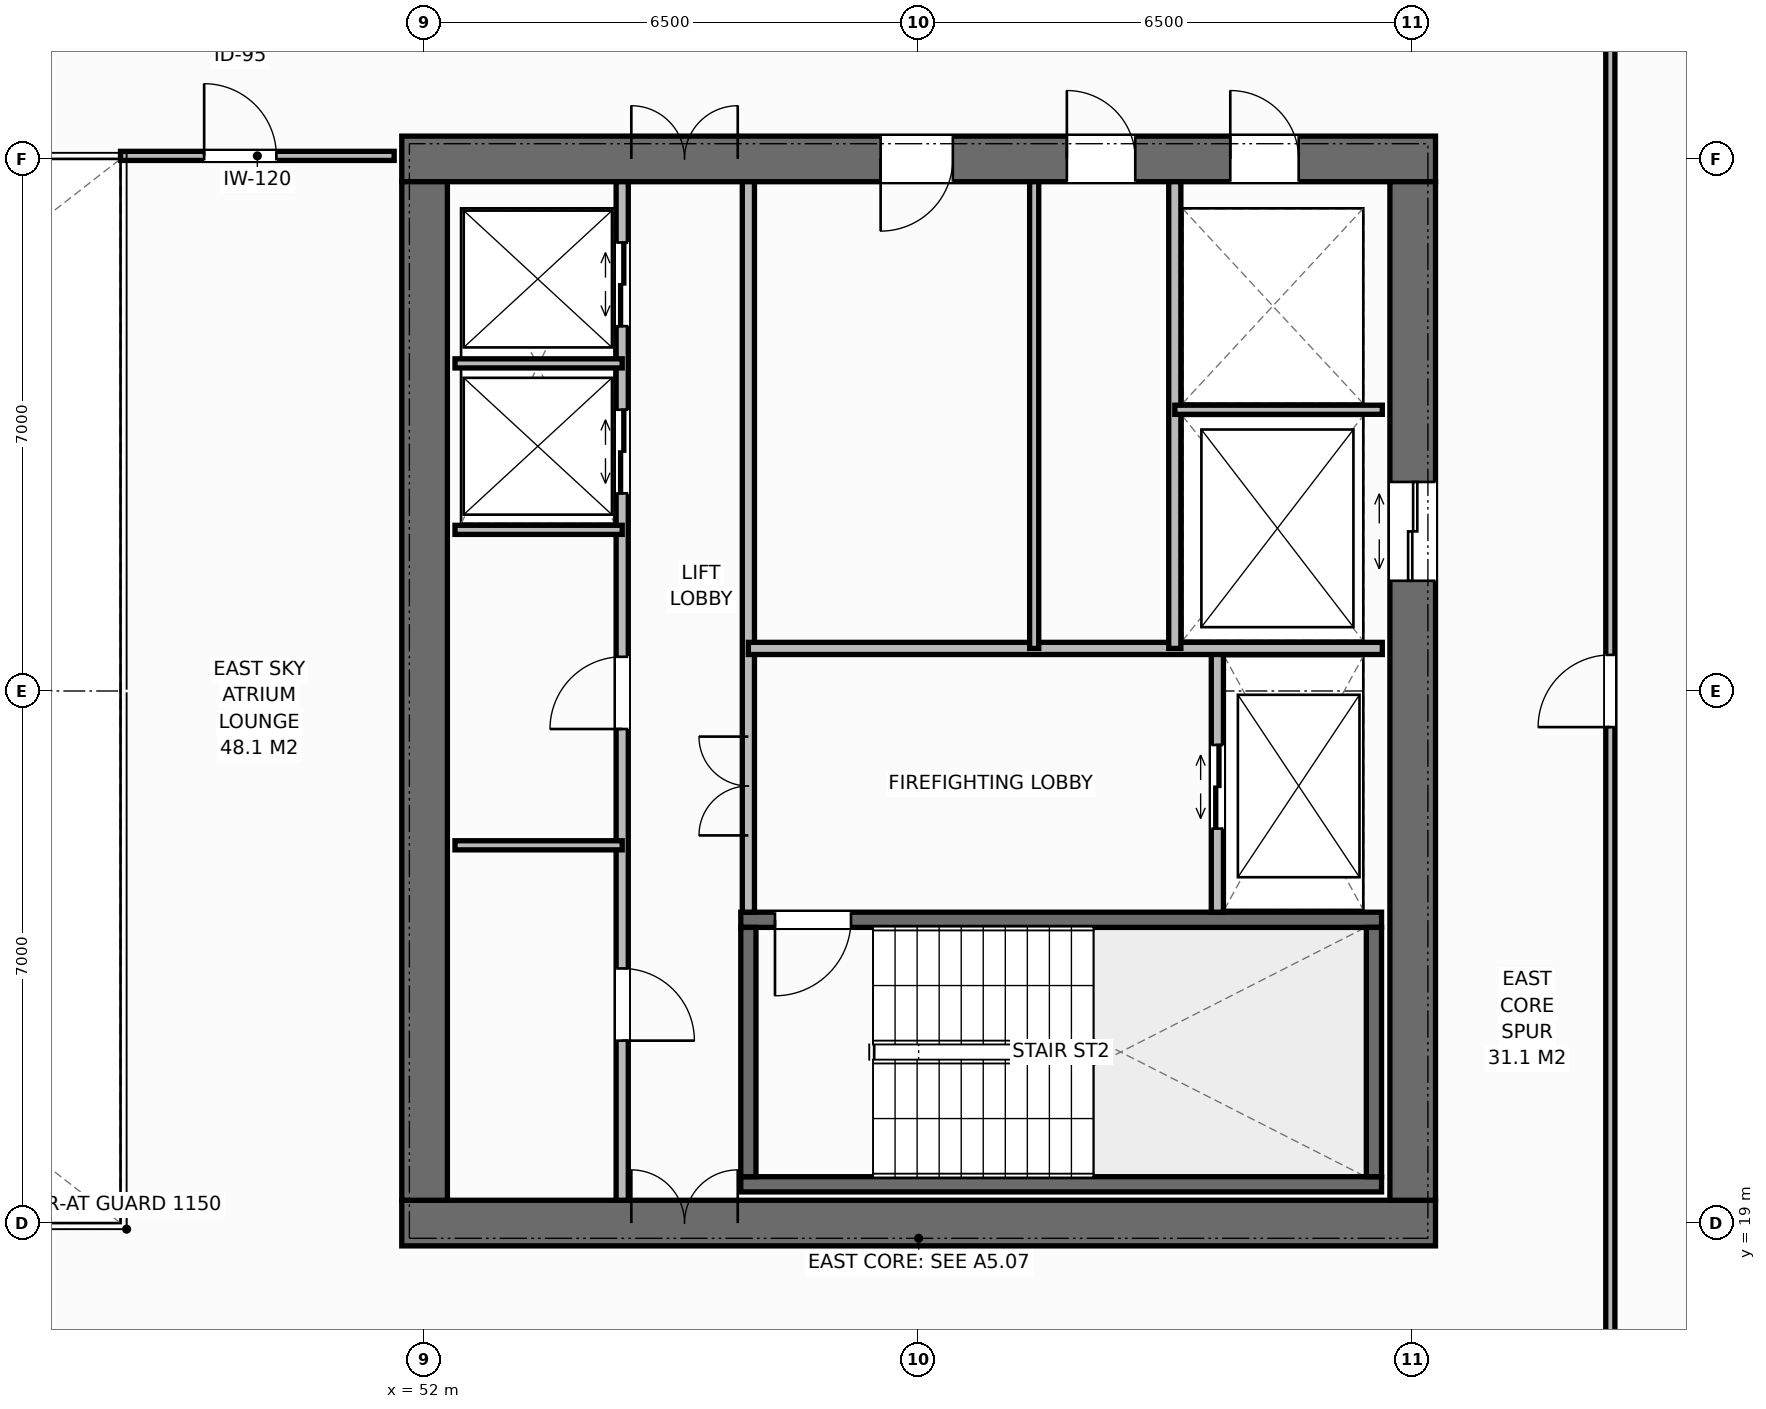
"""IFC4 building model, lengths in metres.
Left out: names, types, materials, properties, quantities, classifications, styles, units other than length and angle.
Written with IfcOpenShell. Run it as: python <this file> out.ifc"""

import sys

from ifc_helpers import new_model, si_unit, direction, frame, frame_2d, origin, place, context, subcontext, project, spatial, rectangle, extrude, element, fill, save


model = new_model("IFC4")
c1 = context("Model", 3, precision=1e-05, world=origin(), true_north=direction((0.0, 1.0)))
c2 = subcontext(c1, "Body", "Model", "MODEL_VIEW")
j1 = project(units=[si_unit("LENGTHUNIT", "METRE"), si_unit("PLANEANGLEUNIT", "RADIAN")], contexts=[c1])
p1 = place(None, origin())
s1 = spatial("IfcSite", under=j1, at=p1, CompositionType="ELEMENT")
p2 = place(p1, origin())
s2 = spatial("IfcBuilding", under=s1, at=p2, CompositionType="ELEMENT")
p3 = place(p2, frame((0.0, 0.0, 155.6)))
s3 = spatial("IfcBuildingStorey", under=s2, at=p3, CompositionType="ELEMENT", Elevation=155.6)
p4 = place(p3, frame((51.7, 19.0, 0.0), z_axis=(0.0, 0.0, 1.0), x_axis=(1.0, 0.0, 0.0)))
e1 = element("IfcWall", 1, at=p4, inside=s3, PredefinedType="SHEAR", context=c2, shape_type="SweptSolid", body=[
    extrude(rectangle(XDim=13.6, YDim=0.6, at=frame_2d((6.8, 0.0))), origin(), (0.0, 0.0, 1.0), 3.8),
])
p5 = place(p4, frame((3.02, 0.0, 0.0)))
e2 = element("IfcOpeningElement", 2, at=p5, cuts=e1, PredefinedType="OPENING", context=c2, shape_type="SweptSolid", body=[
    extrude(rectangle(XDim=1.4, YDim=2.2, at=frame_2d((0.7, 1.1))), frame((0.0, 0.31, 0.0), z_axis=(0.0, -1.0, 0.0), x_axis=(1.0, 0.0, 0.0)), (0.0, 0.0, 1.0), 0.62),
])
p6 = place(p3, frame((51.7, 33.0, 0.0), z_axis=(0.0, 0.0, 1.0), x_axis=(1.0, 0.0, 0.0)))
e3 = element("IfcWall", 3, at=p6, inside=s3, PredefinedType="SHEAR", context=c2, shape_type="SweptSolid", body=[
    extrude(rectangle(XDim=13.6, YDim=0.6, at=frame_2d((6.8, 0.0))), origin(), (0.0, 0.0, 1.0), 3.8),
])
p7 = place(p6, frame((3.02, 0.0, 0.0)))
e4 = element("IfcOpeningElement", 4, at=p7, cuts=e3, PredefinedType="OPENING", context=c2, shape_type="SweptSolid", body=[
    extrude(rectangle(XDim=1.4, YDim=2.2, at=frame_2d((0.7, 1.1))), frame((0.0, 0.31, 0.0), z_axis=(0.0, -1.0, 0.0), x_axis=(1.0, 0.0, 0.0)), (0.0, 0.0, 1.0), 0.62),
])
p8 = place(p6, frame((10.9, 0.0, 0.0)))
e5 = element("IfcOpeningElement", 5, at=p8, cuts=e3, PredefinedType="OPENING", context=c2, shape_type="SweptSolid", body=[
    extrude(rectangle(XDim=0.9, YDim=2.15, at=frame_2d((0.45, 1.075))), frame((0.0, 0.31, 0.0), z_axis=(0.0, -1.0, 0.0), x_axis=(1.0, 0.0, 0.0)), (0.0, 0.0, 1.0), 0.62),
])
p9 = place(p6, frame((6.3, 0.0, 0.0)))
e6 = element("IfcOpeningElement", 6, at=p9, cuts=e3, PredefinedType="OPENING", context=c2, shape_type="SweptSolid", body=[
    extrude(rectangle(XDim=0.95, YDim=2.15, at=frame_2d((0.475, 1.075))), frame((0.0, 0.31, 0.0), z_axis=(0.0, -1.0, 0.0), x_axis=(1.0, 0.0, 0.0)), (0.0, 0.0, 1.0), 0.62),
])
p10 = place(p6, frame((8.75, 0.0, 0.0)))
e7 = element("IfcOpeningElement", 7, at=p10, cuts=e3, PredefinedType="OPENING", context=c2, shape_type="SweptSolid", body=[
    extrude(rectangle(XDim=0.9, YDim=2.15, at=frame_2d((0.45, 1.075))), frame((0.0, 0.31, 0.0), z_axis=(0.0, -1.0, 0.0), x_axis=(1.0, 0.0, 0.0)), (0.0, 0.0, 1.0), 0.62),
])
p11 = place(p3, frame((52.0, 19.3, 0.0), z_axis=(0.0, 0.0, 1.0), x_axis=(0.0, 1.0, 0.0)))
e8 = element("IfcWall", 8, at=p11, inside=s3, PredefinedType="SHEAR", context=c2, shape_type="SweptSolid", body=[
    extrude(rectangle(XDim=13.4, YDim=0.6, at=frame_2d((6.7, 0.0))), origin(), (0.0, 0.0, 1.0), 3.8),
])
p12 = place(p3, frame((65.0, 19.3, 0.0), z_axis=(0.0, 0.0, 1.0), x_axis=(0.0, 1.0, 0.0)))
e9 = element("IfcWall", 9, at=p12, inside=s3, PredefinedType="SHEAR", context=c2, shape_type="SweptSolid", body=[
    extrude(rectangle(XDim=13.4, YDim=0.6, at=frame_2d((6.7, 0.0))), origin(), (0.0, 0.0, 1.0), 3.8),
])
p13 = place(p12, frame((8.15, 0.0, 0.0)))
e10 = element("IfcOpeningElement", 10, at=p13, cuts=e9, PredefinedType="OPENING", context=c2, shape_type="SweptSolid", body=[
    extrude(rectangle(XDim=1.3, YDim=2.2, at=frame_2d((0.65, 1.1))), frame((0.0, 0.31, 0.0), z_axis=(0.0, -1.0, 0.0), x_axis=(1.0, 0.0, 0.0)), (0.0, 0.0, 1.0), 0.62),
])
p14 = place(p3, frame((56.16, 19.51, 0.0), z_axis=(0.0, 0.0, 1.0), x_axis=(1.0, 0.0, 0.0)))
e11 = element("IfcWall", 11, at=p14, inside=s3, PredefinedType="SHEAR", context=c2, shape_type="SweptSolid", body=[
    extrude(rectangle(XDim=8.43, YDim=0.2, at=frame_2d((4.215, 0.0))), origin(), (0.0, 0.0, 1.0), 3.8),
])
p15 = place(p3, frame((56.16, 22.99, 0.0), z_axis=(0.0, 0.0, 1.0), x_axis=(1.0, 0.0, 0.0)))
e12 = element("IfcWall", 12, at=p15, inside=s3, PredefinedType="SHEAR", context=c2, shape_type="SweptSolid", body=[
    extrude(rectangle(XDim=8.43, YDim=0.2, at=frame_2d((4.215, 0.0))), origin(), (0.0, 0.0, 1.0), 3.8),
])
p16 = place(p15, frame((0.45, 0.0, 0.0)))
e13 = element("IfcOpeningElement", 13, at=p16, cuts=e12, PredefinedType="OPENING", context=c2, shape_type="SweptSolid", body=[
    extrude(rectangle(XDim=1.0, YDim=2.15, at=frame_2d((0.5, 1.075))), frame((0.0, 0.11, 0.0), z_axis=(0.0, -1.0, 0.0), x_axis=(1.0, 0.0, 0.0)), (0.0, 0.0, 1.0), 0.22),
])
for number, where, z_axis, x_axis in (
    (14, (56.26, 19.61, 0.0), (0.0, 0.0, 1.0), (0.0, 1.0, 0.0)),
    (15, (64.49, 19.61, 0.0), (0.0, 0.0, 1.0), (0.0, 1.0, 0.0)),
):
    element("IfcWall", number, at=place(p3, frame(where, z_axis=z_axis, x_axis=x_axis)), inside=s3, PredefinedType="SHEAR", context=c2, shape_type="SweptSolid", body=[
        extrude(rectangle(XDim=3.28, YDim=0.2, at=frame_2d((1.64, 0.0))), origin(), (0.0, 0.0, 1.0), 3.8),
    ])
p17 = place(p3, frame((54.6, 19.3, 0.0), z_axis=(0.0, 0.0, 1.0), x_axis=(0.0, 1.0, 0.0)))
e16 = element("IfcWall", 16, at=p17, inside=s3, PredefinedType="STANDARD", context=c2, shape_type="SweptSolid", body=[
    extrude(rectangle(XDim=13.4, YDim=0.16, at=frame_2d((6.7, 0.0))), origin(), (0.0, 0.0, 1.0), 3.572),
])
p18 = place(p17, frame((2.1, 0.0, 0.0)))
e17 = element("IfcOpeningElement", 17, at=p18, cuts=e16, PredefinedType="OPENING", context=c2, shape_type="SweptSolid", body=[
    extrude(rectangle(XDim=0.95, YDim=2.15, at=frame_2d((0.475, 1.075))), frame((0.0, 0.09, 0.0), z_axis=(0.0, -1.0, 0.0), x_axis=(1.0, 0.0, 0.0)), (0.0, 0.0, 1.0), 0.18),
])
p19 = place(p17, frame((6.2, 0.0, 0.0)))
e18 = element("IfcOpeningElement", 18, at=p19, cuts=e16, PredefinedType="OPENING", context=c2, shape_type="SweptSolid", body=[
    extrude(rectangle(XDim=0.95, YDim=2.15, at=frame_2d((0.475, 1.075))), frame((0.0, 0.09, 0.0), z_axis=(0.0, -1.0, 0.0), x_axis=(1.0, 0.0, 0.0)), (0.0, 0.0, 1.0), 0.18),
])
p20 = place(p17, frame((9.3, 0.0, 0.0)))
e19 = element("IfcOpeningElement", 19, at=p20, cuts=e16, PredefinedType="OPENING", context=c2, shape_type="SweptSolid", body=[
    extrude(rectangle(XDim=1.1, YDim=2.2, at=frame_2d((0.55, 1.1))), frame((0.0, 0.09, 0.0), z_axis=(0.0, -1.0, 0.0), x_axis=(1.0, 0.0, 0.0)), (0.0, 0.0, 1.0), 0.18),
])
p21 = place(p17, frame((11.5, 0.0, 0.0)))
e20 = element("IfcOpeningElement", 20, at=p21, cuts=e16, PredefinedType="OPENING", context=c2, shape_type="SweptSolid", body=[
    extrude(rectangle(XDim=1.1, YDim=2.2, at=frame_2d((0.55, 1.1))), frame((0.0, 0.09, 0.0), z_axis=(0.0, -1.0, 0.0), x_axis=(1.0, 0.0, 0.0)), (0.0, 0.0, 1.0), 0.18),
])
p22 = place(p3, frame((56.26, 23.09, 0.0), z_axis=(0.0, 0.0, 1.0), x_axis=(0.0, 1.0, 0.0)))
e21 = element("IfcWall", 21, at=p22, inside=s3, PredefinedType="STANDARD", context=c2, shape_type="SweptSolid", body=[
    extrude(rectangle(XDim=9.61, YDim=0.16, at=frame_2d((4.805, 0.0))), origin(), (0.0, 0.0, 1.0), 3.572),
])
p23 = place(p22, frame((1.01, 0.0, 0.0)))
e22 = element("IfcOpeningElement", 22, at=p23, cuts=e21, PredefinedType="OPENING", context=c2, shape_type="SweptSolid", body=[
    extrude(rectangle(XDim=1.3, YDim=2.2, at=frame_2d((0.65, 1.1))), frame((0.0, 0.09, 0.0), z_axis=(0.0, -1.0, 0.0), x_axis=(1.0, 0.0, 0.0)), (0.0, 0.0, 1.0), 0.18),
])
for number, where, z_axis, x_axis in (
    (23, (52.4, 23.97, 0.0), (0.0, 0.0, 1.0), (1.0, 0.0, 0.0)),
    (24, (52.4, 28.12, 0.0), (0.0, 0.0, 1.0), (1.0, 0.0, 0.0)),
    (25, (52.4, 30.31, 0.0), (0.0, 0.0, 1.0), (1.0, 0.0, 0.0)),
):
    element("IfcWall", number, at=place(p3, frame(where, z_axis=z_axis, x_axis=x_axis)), inside=s3, PredefinedType="PARTITIONING", context=c2, shape_type="SweptSolid", body=[
        extrude(rectangle(XDim=2.2, YDim=0.12, at=frame_2d((1.1, 0.0))), origin(), (0.0, 0.0, 1.0), 3.572),
    ])
p24 = place(p3, frame((62.43, 23.09, 0.0), z_axis=(0.0, 0.0, 1.0), x_axis=(0.0, 1.0, 0.0)))
e26 = element("IfcWall", 26, at=p24, inside=s3, PredefinedType="STANDARD", context=c2, shape_type="SweptSolid", body=[
    extrude(rectangle(XDim=3.47, YDim=0.16, at=frame_2d((1.735, 0.0))), origin(), (0.0, 0.0, 1.0), 3.572),
])
p25 = place(p24, frame((1.1, 0.0, 0.0)))
e27 = element("IfcOpeningElement", 27, at=p25, cuts=e26, PredefinedType="OPENING", context=c2, shape_type="SweptSolid", body=[
    extrude(rectangle(XDim=1.1, YDim=2.2, at=frame_2d((0.55, 1.1))), frame((0.0, 0.09, 0.0), z_axis=(0.0, -1.0, 0.0), x_axis=(1.0, 0.0, 0.0)), (0.0, 0.0, 1.0), 0.18),
])
p26 = place(p3, frame((56.26, 26.56, 0.0), z_axis=(0.0, 0.0, 1.0), x_axis=(1.0, 0.0, 0.0)))
e28 = element("IfcWall", 28, at=p26, inside=s3, PredefinedType="STANDARD", context=c2, shape_type="SweptSolid", body=[
    extrude(rectangle(XDim=8.34, YDim=0.16, at=frame_2d((4.17, 0.0))), origin(), (0.0, 0.0, 1.0), 3.572),
])
p27 = place(p3, frame((61.87, 26.56, 0.0), z_axis=(0.0, 0.0, 1.0), x_axis=(0.0, 1.0, 0.0)))
e29 = element("IfcWall", 29, at=p27, inside=s3, PredefinedType="STANDARD", context=c2, shape_type="SweptSolid", body=[
    extrude(rectangle(XDim=6.14, YDim=0.16, at=frame_2d((3.07, 0.0))), origin(), (0.0, 0.0, 1.0), 3.572),
])
p28 = place(p3, frame((61.87, 29.7, 0.0), z_axis=(0.0, 0.0, 1.0), x_axis=(1.0, 0.0, 0.0)))
e30 = element("IfcWall", 30, at=p28, inside=s3, PredefinedType="PARTITIONING", context=c2, shape_type="SweptSolid", body=[
    extrude(rectangle(XDim=2.73, YDim=0.12, at=frame_2d((1.365, 0.0))), origin(), (0.0, 0.0, 1.0), 3.572),
])
p29 = place(p3, frame((60.02, 26.56, 0.0), z_axis=(0.0, 0.0, 1.0), x_axis=(0.0, 1.0, 0.0)))
e31 = element("IfcWall", 31, at=p29, inside=s3, PredefinedType="PARTITIONING", context=c2, shape_type="SweptSolid", body=[
    extrude(rectangle(XDim=6.14, YDim=0.12, at=frame_2d((3.07, 0.0))), origin(), (0.0, 0.0, 1.0), 3.572),
])
p30 = place(p3, frame((48.0, 33.04, 0.0), z_axis=(0.0, 0.0, 1.0), x_axis=(1.0, 0.0, 0.0)))
e32 = element("IfcWall", 32, at=p30, inside=s3, PredefinedType="PARTITIONING", context=c2, shape_type="SweptSolid", body=[
    extrude(rectangle(XDim=3.6, YDim=0.12, at=frame_2d((1.8, 0.0))), origin(), (0.0, 0.0, 1.0), 3.312),
])
p31 = place(p30, frame((1.1, 0.0, 0.0)))
e33 = element("IfcOpeningElement", 33, at=p31, cuts=e32, PredefinedType="OPENING", context=c2, shape_type="SweptSolid", body=[
    extrude(rectangle(XDim=0.95, YDim=2.15, at=frame_2d((0.475, 1.075))), frame((0.0, 0.07, 0.0), z_axis=(0.0, -1.0, 0.0), x_axis=(1.0, 0.0, 0.0)), (0.0, 0.0, 1.0), 0.14),
])
p32 = place(p3, frame((67.6, 16.5, 0.0), z_axis=(0.0, 0.0, 1.0), x_axis=(0.0, 1.0, 0.0)))
e34 = element("IfcWall", 34, at=p32, inside=s3, PredefinedType="PARTITIONING", context=c2, shape_type="SweptSolid", body=[
    extrude(rectangle(XDim=19.0, YDim=0.12, at=frame_2d((9.5, 0.0))), origin(), (0.0, 0.0, 1.0), 3.572),
])
p33 = place(p32, frame((9.025, 0.0, 0.0)))
e35 = element("IfcOpeningElement", 35, at=p33, cuts=e34, PredefinedType="OPENING", context=c2, shape_type="SweptSolid", body=[
    extrude(rectangle(XDim=0.95, YDim=2.15, at=frame_2d((0.475, 1.075))), frame((0.0, 0.07, 0.0), z_axis=(0.0, -1.0, 0.0), x_axis=(1.0, 0.0, 0.0)), (0.0, 0.0, 1.0), 0.14),
])
p34 = place(p5, origin())
e36 = element("IfcDoor", 36, at=p34, inside=s3, OperationType="DOUBLE_DOOR_SINGLE_SWING", PredefinedType="DOOR", context=c2, shape_type="SweptSolid", body=[
    extrude(rectangle(XDim=1.4, YDim=2.2, at=frame_2d((0.7, 1.1))), frame((0.0, 0.075, 0.0), z_axis=(0.0, -1.0, 0.0), x_axis=(1.0, 0.0, 0.0)), (0.0, 0.0, 1.0), 0.05),
])
fill(e2, e36)
p35 = place(p7, origin())
e37 = element("IfcDoor", 37, at=p35, inside=s3, OperationType="DOUBLE_DOOR_SINGLE_SWING", PredefinedType="DOOR", context=c2, shape_type="SweptSolid", body=[
    extrude(rectangle(XDim=1.4, YDim=2.2, at=frame_2d((0.7, 1.1))), frame((0.0, -0.025, 0.0), z_axis=(0.0, -1.0, 0.0), x_axis=(1.0, 0.0, 0.0)), (0.0, 0.0, 1.0), 0.05),
])
fill(e4, e37)
p36 = place(p18, origin())
e38 = element("IfcDoor", 38, at=p36, inside=s3, OperationType="SINGLE_SWING_RIGHT", PredefinedType="DOOR", context=c2, shape_type="SweptSolid", body=[
    extrude(rectangle(XDim=0.95, YDim=2.15, at=frame_2d((0.475, 1.075))), frame((0.0, 0.025, 0.0), z_axis=(0.0, -1.0, 0.0), x_axis=(1.0, 0.0, 0.0)), (0.0, 0.0, 1.0), 0.05),
])
fill(e17, e38)
p37 = place(p19, origin())
e39 = element("IfcDoor", 39, at=p37, inside=s3, OperationType="SINGLE_SWING_LEFT", PredefinedType="DOOR", context=c2, shape_type="SweptSolid", body=[
    extrude(rectangle(XDim=0.95, YDim=2.15, at=frame_2d((0.475, 1.075))), frame((0.0, 0.025, 0.0), z_axis=(0.0, -1.0, 0.0), x_axis=(1.0, 0.0, 0.0)), (0.0, 0.0, 1.0), 0.05),
])
fill(e18, e39)
p38 = place(p20, origin())
e40 = element("IfcDoor", 40, at=p38, inside=s3, OperationType="DOUBLE_DOOR_SLIDING", PredefinedType="DOOR", context=c2, shape_type="SweptSolid", body=[
    extrude(rectangle(XDim=1.1, YDim=2.2, at=frame_2d((0.55, 1.1))), frame((0.0, 0.025, 0.0), z_axis=(0.0, -1.0, 0.0), x_axis=(1.0, 0.0, 0.0)), (0.0, 0.0, 1.0), 0.05),
])
fill(e19, e40)
p39 = place(p21, origin())
e41 = element("IfcDoor", 41, at=p39, inside=s3, OperationType="DOUBLE_DOOR_SLIDING", PredefinedType="DOOR", context=c2, shape_type="SweptSolid", body=[
    extrude(rectangle(XDim=1.1, YDim=2.2, at=frame_2d((0.55, 1.1))), frame((0.0, 0.025, 0.0), z_axis=(0.0, -1.0, 0.0), x_axis=(1.0, 0.0, 0.0)), (0.0, 0.0, 1.0), 0.05),
])
fill(e20, e41)
p40 = place(p16, origin())
e42 = element("IfcDoor", 42, at=p40, inside=s3, OperationType="SINGLE_SWING_RIGHT", PredefinedType="DOOR", context=c2, shape_type="SweptSolid", body=[
    extrude(rectangle(XDim=1.0, YDim=2.15, at=frame_2d((0.5, 1.075))), frame((0.0, 0.025, 0.0), z_axis=(0.0, -1.0, 0.0), x_axis=(1.0, 0.0, 0.0)), (0.0, 0.0, 1.0), 0.05),
])
fill(e13, e42)
p41 = place(p25, origin())
e43 = element("IfcDoor", 43, at=p41, inside=s3, OperationType="DOUBLE_DOOR_SLIDING", PredefinedType="DOOR", context=c2, shape_type="SweptSolid", body=[
    extrude(rectangle(XDim=1.1, YDim=2.2, at=frame_2d((0.55, 1.1))), frame((0.0, 0.025, 0.0), z_axis=(0.0, -1.0, 0.0), x_axis=(1.0, 0.0, 0.0)), (0.0, 0.0, 1.0), 0.05),
])
fill(e27, e43)
p42 = place(p23, origin())
e44 = element("IfcDoor", 44, at=p42, inside=s3, OperationType="DOUBLE_DOOR_SINGLE_SWING", PredefinedType="DOOR", context=c2, shape_type="SweptSolid", body=[
    extrude(rectangle(XDim=1.3, YDim=2.2, at=frame_2d((0.65, 1.1))), frame((0.0, 0.025, 0.0), z_axis=(0.0, -1.0, 0.0), x_axis=(1.0, 0.0, 0.0)), (0.0, 0.0, 1.0), 0.05),
])
fill(e22, e44)
p43 = place(p13, origin())
e45 = element("IfcDoor", 45, at=p43, inside=s3, OperationType="DOUBLE_DOOR_SLIDING", PredefinedType="DOOR", context=c2, shape_type="SweptSolid", body=[
    extrude(rectangle(XDim=1.3, YDim=2.2, at=frame_2d((0.65, 1.1))), frame((0.0, 0.025, 0.0), z_axis=(0.0, -1.0, 0.0), x_axis=(1.0, 0.0, 0.0)), (0.0, 0.0, 1.0), 0.05),
])
fill(e10, e45)
p44 = place(p8, origin())
e46 = element("IfcDoor", 46, at=p44, inside=s3, OperationType="SINGLE_SWING_LEFT", PredefinedType="DOOR", context=c2, shape_type="SweptSolid", body=[
    extrude(rectangle(XDim=0.9, YDim=2.15, at=frame_2d((0.45, 1.075))), frame((0.0, -0.025, 0.0), z_axis=(0.0, -1.0, 0.0), x_axis=(1.0, 0.0, 0.0)), (0.0, 0.0, 1.0), 0.05),
])
fill(e5, e46)
p45 = place(p9, origin())
e47 = element("IfcDoor", 47, at=p45, inside=s3, OperationType="SINGLE_SWING_RIGHT", PredefinedType="DOOR", context=c2, shape_type="SweptSolid", body=[
    extrude(rectangle(XDim=0.95, YDim=2.15, at=frame_2d((0.475, 1.075))), frame((0.0, -0.025, 0.0), z_axis=(0.0, -1.0, 0.0), x_axis=(1.0, 0.0, 0.0)), (0.0, 0.0, 1.0), 0.05),
])
fill(e6, e47)
p46 = place(p10, origin())
e48 = element("IfcDoor", 48, at=p46, inside=s3, OperationType="SINGLE_SWING_LEFT", PredefinedType="DOOR", context=c2, shape_type="SweptSolid", body=[
    extrude(rectangle(XDim=0.9, YDim=2.15, at=frame_2d((0.45, 1.075))), frame((0.0, -0.025, 0.0), z_axis=(0.0, -1.0, 0.0), x_axis=(1.0, 0.0, 0.0)), (0.0, 0.0, 1.0), 0.05),
])
fill(e7, e48)
p47 = place(p31, origin())
e49 = element("IfcDoor", 49, at=p47, inside=s3, OperationType="SINGLE_SWING_LEFT", PredefinedType="DOOR", context=c2, shape_type="SweptSolid", body=[
    extrude(rectangle(XDim=0.95, YDim=2.15, at=frame_2d((0.475, 1.075))), frame((0.0, 0.025, 0.0), z_axis=(0.0, -1.0, 0.0), x_axis=(1.0, 0.0, 0.0)), (0.0, 0.0, 1.0), 0.05),
])
fill(e33, e49)
p48 = place(p33, origin())
e50 = element("IfcDoor", 50, at=p48, inside=s3, OperationType="SINGLE_SWING_LEFT", PredefinedType="DOOR", context=c2, shape_type="SweptSolid", body=[
    extrude(rectangle(XDim=0.95, YDim=2.15, at=frame_2d((0.475, 1.075))), frame((0.0, 0.025, 0.0), z_axis=(0.0, -1.0, 0.0), x_axis=(1.0, 0.0, 0.0)), (0.0, 0.0, 1.0), 0.05),
])
fill(e35, e50)
save(model, sys.argv[1])
